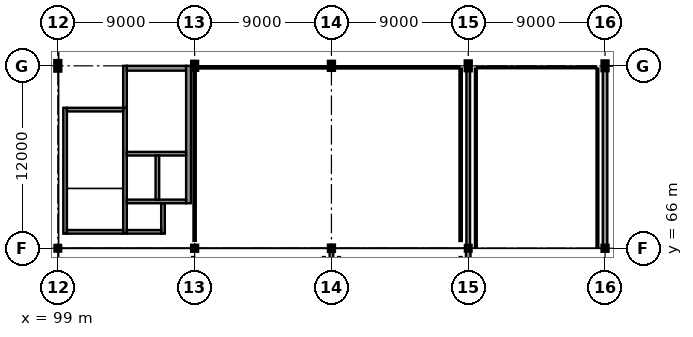
"""IFC4 building model, lengths in metres.
Left out: names, types, materials, properties, quantities, classifications, styles, units other than length and angle.
Written with IfcOpenShell. Run it as: python <this file> out.ifc"""

import sys

from ifc_helpers import new_model, si_unit, direction, frame, frame_2d, origin, origin_2d, place, context, subcontext, project, spatial, rectangle, i_section, extrude, element, fill, save


model = new_model("IFC4")
c1 = context("Model", 3, precision=1e-05, world=origin(), true_north=direction((0.0, 1.0)))
c2 = subcontext(c1, "Body", "Model", "MODEL_VIEW")
j1 = project(units=[si_unit("LENGTHUNIT", "METRE"), si_unit("PLANEANGLEUNIT", "RADIAN")], contexts=[c1])
p1 = place(None, origin())
s1 = spatial("IfcSite", under=j1, at=p1, CompositionType="ELEMENT")
p2 = place(p1, origin())
s2 = spatial("IfcBuilding", under=s1, at=p2, CompositionType="ELEMENT")
p3 = place(p2, frame((0.0, 0.0, 9.9)))
s3 = spatial("IfcBuildingStorey", under=s2, at=p3, CompositionType="ELEMENT", Elevation=9.9)
p4 = place(p3, frame((99.0, 66.0, 0.0), z_axis=(0.0, 0.0, 1.0), x_axis=(1.0, 0.0, 0.0)))
e1 = element("IfcColumn", 1, at=p4, inside=s3, PredefinedType="COLUMN", context=c2, shape_type="SweptSolid", body=[
    extrude(i_section(OverallWidth=0.28, OverallDepth=0.28, WebThickness=0.01, FlangeThickness=0.018, at=origin_2d()), origin(), (0.0, 0.0, 1.0), 4.5),
])
p5 = place(p3, frame((99.0, 78.0, 0.0), z_axis=(0.0, 0.0, 1.0), x_axis=(1.0, 0.0, 0.0)))
e2 = element("IfcColumn", 2, at=p5, inside=s3, PredefinedType="COLUMN", context=c2, shape_type="SweptSolid", body=[
    extrude(i_section(OverallWidth=0.3, OverallDepth=0.6, WebThickness=0.015, FlangeThickness=0.03, at=origin_2d()), origin(), (0.0, 0.0, 1.0), 4.5),
])
p6 = place(p3, frame((108.0, 66.0, 0.0), z_axis=(0.0, 0.0, 1.0), x_axis=(1.0, 0.0, 0.0)))
e3 = element("IfcColumn", 3, at=p6, inside=s3, PredefinedType="COLUMN", context=c2, shape_type="SweptSolid", body=[
    extrude(i_section(OverallWidth=0.3, OverallDepth=0.3, WebThickness=0.011, FlangeThickness=0.019, at=origin_2d()), origin(), (0.0, 0.0, 1.0), 4.5),
])
p7 = place(p3, frame((108.0, 78.0, 0.0), z_axis=(0.0, 0.0, 1.0), x_axis=(0.0, 1.0, 0.0)))
e4 = element("IfcColumn", 4, at=p7, inside=s3, PredefinedType="COLUMN", context=c2, shape_type="SweptSolid", body=[
    extrude(i_section(OverallWidth=0.3, OverallDepth=0.5, WebThickness=0.014, FlangeThickness=0.028, at=origin_2d()), origin(), (0.0, 0.0, 1.0), 4.5),
])
p8 = place(p3, frame((117.0, 66.0, 0.0), z_axis=(0.0, 0.0, 1.0), x_axis=(1.0, 0.0, 0.0)))
e5 = element("IfcColumn", 5, at=p8, inside=s3, PredefinedType="COLUMN", context=c2, shape_type="SweptSolid", body=[
    extrude(i_section(OverallWidth=0.3, OverallDepth=0.32, WebThickness=0.011, FlangeThickness=0.021, at=origin_2d()), origin(), (0.0, 0.0, 1.0), 4.5),
])
p9 = place(p3, frame((117.0, 78.0, 0.0), z_axis=(0.0, 0.0, 1.0), x_axis=(1.0, 0.0, 0.0)))
e6 = element("IfcColumn", 6, at=p9, inside=s3, PredefinedType="COLUMN", context=c2, shape_type="SweptSolid", body=[
    extrude(i_section(OverallWidth=0.3, OverallDepth=0.5, WebThickness=0.014, FlangeThickness=0.028, at=origin_2d()), origin(), (0.0, 0.0, 1.0), 4.5),
])
p10 = place(p3, frame((126.0, 66.0, 0.0), z_axis=(0.0, 0.0, 1.0), x_axis=(0.0, 1.0, 0.0)))
e7 = element("IfcColumn", 7, at=p10, inside=s3, PredefinedType="COLUMN", context=c2, shape_type="SweptSolid", body=[
    extrude(i_section(OverallWidth=0.28, OverallDepth=0.28, WebThickness=0.01, FlangeThickness=0.018, at=origin_2d()), origin(), (0.0, 0.0, 1.0), 4.5),
])
p11 = place(p3, frame((126.0, 78.0, 0.0), z_axis=(0.0, 0.0, 1.0), x_axis=(1.0, 0.0, 0.0)))
e8 = element("IfcColumn", 8, at=p11, inside=s3, PredefinedType="COLUMN", context=c2, shape_type="SweptSolid", body=[
    extrude(i_section(OverallWidth=0.3, OverallDepth=0.55, WebThickness=0.015, FlangeThickness=0.029, at=origin_2d()), origin(), (0.0, 0.0, 1.0), 4.5),
])
p12 = place(p3, frame((135.0, 66.0, 0.0), z_axis=(0.0, 0.0, 1.0), x_axis=(1.0, 0.0, 0.0)))
e9 = element("IfcColumn", 9, at=p12, inside=s3, PredefinedType="COLUMN", context=c2, shape_type="SweptSolid", body=[
    extrude(i_section(OverallWidth=0.3, OverallDepth=0.3, WebThickness=0.011, FlangeThickness=0.019, at=origin_2d()), origin(), (0.0, 0.0, 1.0), 4.5),
])
p13 = place(p3, frame((135.0, 78.0, 0.0), z_axis=(0.0, 0.0, 1.0), x_axis=(1.0, 0.0, 0.0)))
e10 = element("IfcColumn", 10, at=p13, inside=s3, PredefinedType="COLUMN", context=c2, shape_type="SweptSolid", body=[
    extrude(i_section(OverallWidth=0.3, OverallDepth=0.55, WebThickness=0.015, FlangeThickness=0.029, at=origin_2d()), origin(), (0.0, 0.0, 1.0), 4.5),
])
p14 = place(p3, frame((135.0, 66.148, 0.0), z_axis=(0.0, 0.0, 1.0), x_axis=(0.0, 1.0, 0.0)))
e11 = element("IfcWall", 11, at=p14, inside=s3, PredefinedType="SOLIDWALL", context=c2, shape_type="SweptSolid", body=[
    extrude(rectangle(XDim=11.579, YDim=0.3, at=frame_2d((5.79, 0.0))), origin(), (0.0, 0.0, 1.0), 3.845),
])
p15 = place(p14, frame((2.242, 0.0, 0.8)))
e12 = element("IfcOpeningElement", 12, at=p15, cuts=e11, PredefinedType="OPENING", context=c2, shape_type="SweptSolid", body=[
    extrude(rectangle(XDim=2.0, YDim=2.0, at=frame_2d((1.0, 1.0))), frame((0.0, 0.165, 0.0), z_axis=(0.0, -1.0, 0.0), x_axis=(1.0, 0.0, 0.0)), (0.0, 0.0, 1.0), 0.33),
])
p16 = place(p14, frame((7.337, 0.0, 0.8)))
e13 = element("IfcOpeningElement", 13, at=p16, cuts=e11, PredefinedType="OPENING", context=c2, shape_type="SweptSolid", body=[
    extrude(rectangle(XDim=2.0, YDim=2.0, at=frame_2d((1.0, 1.0))), frame((0.0, 0.165, 0.0), z_axis=(0.0, -1.0, 0.0), x_axis=(1.0, 0.0, 0.0)), (0.0, 0.0, 1.0), 0.33),
])
p17 = place(p3, frame((126.0, 54.138, 0.0), z_axis=(0.0, 0.0, 1.0), x_axis=(0.0, 1.0, 0.0)))
e14 = element("IfcWall", 14, at=p17, inside=s3, PredefinedType="SOLIDWALL", context=c2, shape_type="SweptSolid", body=[
    extrude(rectangle(XDim=11.854, YDim=0.3, at=frame_2d((5.927, 0.0))), origin(), (0.0, 0.0, 1.0), 3.695),
])
p18 = place(p3, frame((99.48, 66.96, 0.0), z_axis=(0.0, 0.0, 1.0), x_axis=(0.0, 1.0, 0.0)))
e15 = element("IfcWall", 15, at=p18, inside=s3, PredefinedType="SHEAR", context=c2, shape_type="SweptSolid", body=[
    extrude(rectangle(XDim=8.28, YDim=0.24, at=frame_2d((4.14, 0.0))), origin(), (0.0, 0.0, 1.0), 4.31),
])
p19 = place(p3, frame((103.42, 66.96, 0.0), z_axis=(0.0, 0.0, 1.0), x_axis=(0.0, 1.0, 0.0)))
e16 = element("IfcWall", 16, at=p19, inside=s3, PredefinedType="SHEAR", context=c2, shape_type="SweptSolid", body=[
    extrude(rectangle(XDim=8.28, YDim=0.24, at=frame_2d((4.14, 0.0))), origin(), (0.0, 0.0, 1.0), 4.31),
])
p20 = place(p19, frame((6.49, 0.0, 0.0)))
e17 = element("IfcOpeningElement", 17, at=p20, cuts=e16, PredefinedType="OPENING", context=c2, shape_type="SweptSolid", body=[
    extrude(rectangle(XDim=1.3, YDim=2.2, at=frame_2d((0.65, 1.1))), frame((0.0, 0.135, 0.0), z_axis=(0.0, -1.0, 0.0), x_axis=(1.0, 0.0, 0.0)), (0.0, 0.0, 1.0), 0.27),
])
for number, where, z_axis, x_axis in (
    (18, (99.6, 67.08, 0.0), (0.0, 0.0, 1.0), (1.0, 0.0, 0.0)),
    (19, (99.6, 75.12, 0.0), (0.0, 0.0, 1.0), (1.0, 0.0, 0.0)),
):
    element("IfcWall", number, at=place(p3, frame(where, z_axis=z_axis, x_axis=x_axis)), inside=s3, PredefinedType="SHEAR", context=c2, shape_type="SweptSolid", body=[
        extrude(rectangle(XDim=3.7, YDim=0.24, at=frame_2d((1.85, 0.0))), origin(), (0.0, 0.0, 1.0), 4.31),
    ])
p21 = place(p3, frame((103.42, 75.24, 0.0), z_axis=(0.0, 0.0, 1.0), x_axis=(0.0, 1.0, 0.0)))
e20 = element("IfcWall", 20, at=p21, inside=s3, PredefinedType="SHEAR", context=c2, shape_type="SweptSolid", body=[
    extrude(rectangle(XDim=2.76, YDim=0.24, at=frame_2d((1.38, 0.0))), origin(), (0.0, 0.0, 1.0), 4.16),
])
p22 = place(p3, frame((103.54, 77.84, 0.0), z_axis=(0.0, 0.0, 1.0), x_axis=(1.0, 0.0, 0.0)))
e21 = element("IfcWall", 21, at=p22, inside=s3, PredefinedType="SHEAR", context=c2, shape_type="SweptSolid", body=[
    extrude(rectangle(XDim=3.9, YDim=0.32, at=frame_2d((1.95, 0.0))), origin(), (0.0, 0.0, 1.0), 4.16),
])
p23 = place(p22, frame((1.225, 0.0, 0.0)))
e22 = element("IfcOpeningElement", 22, at=p23, cuts=e21, PredefinedType="OPENING", context=c2, shape_type="SweptSolid", body=[
    extrude(rectangle(XDim=1.45, YDim=2.2, at=frame_2d((0.725, 1.1))), frame((0.0, 0.175, 0.0), z_axis=(0.0, -1.0, 0.0), x_axis=(1.0, 0.0, 0.0)), (0.0, 0.0, 1.0), 0.35),
])
p24 = place(p3, frame((107.6, 68.96, 0.0), z_axis=(0.0, 0.0, 1.0), x_axis=(0.0, 1.0, 0.0)))
e23 = element("IfcWall", 23, at=p24, inside=s3, PredefinedType="SHEAR", context=c2, shape_type="SweptSolid", body=[
    extrude(rectangle(XDim=9.04, YDim=0.32, at=frame_2d((4.52, 0.0))), origin(), (0.0, 0.0, 1.0), 4.16),
])
p25 = place(p3, frame((103.54, 72.22, 0.0), z_axis=(0.0, 0.0, 1.0), x_axis=(1.0, 0.0, 0.0)))
e24 = element("IfcWall", 24, at=p25, inside=s3, PredefinedType="SHEAR", context=c2, shape_type="SweptSolid", body=[
    extrude(rectangle(XDim=3.9, YDim=0.24, at=frame_2d((1.95, 0.0))), origin(), (0.0, 0.0, 1.0), 4.31),
])
p26 = place(p25, frame((0.385, 0.0, 0.0)))
e25 = element("IfcOpeningElement", 25, at=p26, cuts=e24, PredefinedType="OPENING", context=c2, shape_type="SweptSolid", body=[
    extrude(rectangle(XDim=1.3, YDim=2.2, at=frame_2d((0.65, 1.1))), frame((0.0, 0.135, 0.0), z_axis=(0.0, -1.0, 0.0), x_axis=(1.0, 0.0, 0.0)), (0.0, 0.0, 1.0), 0.27),
])
p27 = place(p25, frame((2.335, 0.0, 0.0)))
e26 = element("IfcOpeningElement", 26, at=p27, cuts=e24, PredefinedType="OPENING", context=c2, shape_type="SweptSolid", body=[
    extrude(rectangle(XDim=1.3, YDim=2.2, at=frame_2d((0.65, 1.1))), frame((0.0, 0.135, 0.0), z_axis=(0.0, -1.0, 0.0), x_axis=(1.0, 0.0, 0.0)), (0.0, 0.0, 1.0), 0.27),
])
p28 = place(p3, frame((103.54, 69.08, 0.0), z_axis=(0.0, 0.0, 1.0), x_axis=(1.0, 0.0, 0.0)))
e27 = element("IfcWall", 27, at=p28, inside=s3, PredefinedType="SHEAR", context=c2, shape_type="SweptSolid", body=[
    extrude(rectangle(XDim=3.9, YDim=0.24, at=frame_2d((1.95, 0.0))), origin(), (0.0, 0.0, 1.0), 4.31),
])
p29 = place(p3, frame((105.55, 69.2, 0.0), z_axis=(0.0, 0.0, 1.0), x_axis=(0.0, 1.0, 0.0)))
e28 = element("IfcWall", 28, at=p29, inside=s3, PredefinedType="SHEAR", context=c2, shape_type="SweptSolid", body=[
    extrude(rectangle(XDim=2.9, YDim=0.24, at=frame_2d((1.45, 0.0))), origin(), (0.0, 0.0, 1.0), 4.31),
])
p30 = place(p3, frame((105.92, 66.96, 0.0), z_axis=(0.0, 0.0, 1.0), x_axis=(0.0, 1.0, 0.0)))
e29 = element("IfcWall", 29, at=p30, inside=s3, PredefinedType="SHEAR", context=c2, shape_type="SweptSolid", body=[
    extrude(rectangle(XDim=2.0, YDim=0.24, at=frame_2d((1.0, 0.0))), origin(), (0.0, 0.0, 1.0), 4.31),
])
p31 = place(p3, frame((103.54, 67.08, 0.0), z_axis=(0.0, 0.0, 1.0), x_axis=(1.0, 0.0, 0.0)))
e30 = element("IfcWall", 30, at=p31, inside=s3, PredefinedType="SHEAR", context=c2, shape_type="SweptSolid", body=[
    extrude(rectangle(XDim=2.26, YDim=0.24, at=frame_2d((1.13, 0.0))), origin(), (0.0, 0.0, 1.0), 4.31),
])
p32 = place(p3, frame((126.0, 66.008, 0.0), z_axis=(0.0, 0.0, 1.0), x_axis=(0.0, 1.0, 0.0)))
e31 = element("IfcWall", 31, at=p32, inside=s3, PredefinedType="SHEAR", context=c2, shape_type="SweptSolid", body=[
    extrude(rectangle(XDim=11.719, YDim=0.24, at=frame_2d((5.859, 0.0))), origin(), (0.0, 0.0, 1.0), 3.595),
])
p33 = place(p3, frame((117.0, 54.128, 0.0), z_axis=(0.0, 0.0, 1.0), x_axis=(0.0, 1.0, 0.0)))
e32 = element("IfcWall", 32, at=p33, inside=s3, PredefinedType="SHEAR", context=c2, shape_type="SweptSolid", body=[
    extrude(rectangle(XDim=11.714, YDim=0.24, at=frame_2d((5.857, 0.0))), origin(), (0.0, 0.0, 1.0), 3.745),
])
p34 = place(p3, frame((108.0, 66.48, 0.0), z_axis=(0.0, 0.0, 1.0), x_axis=(0.0, 1.0, 0.0)))
e33 = element("IfcWall", 33, at=p34, inside=s3, PredefinedType="PARTITIONING", context=c2, shape_type="SweptSolid", body=[
    extrude(rectangle(XDim=11.34, YDim=0.15, at=frame_2d((5.67, 0.0))), origin(), (0.0, 0.0, 1.0), 3.705),
])
p35 = place(p3, frame((107.848, 77.9, 0.0), z_axis=(0.0, 0.0, 1.0), x_axis=(1.0, 0.0, 0.0)))
e34 = element("IfcWall", 34, at=p35, inside=s3, PredefinedType="PARTITIONING", context=c2, shape_type="SweptSolid", body=[
    extrude(rectangle(XDim=17.572, YDim=0.15, at=frame_2d((8.786, 0.0))), origin(), (0.0, 0.0, 1.0), 3.705),
])
p36 = place(p35, frame((7.558, 0.0, 0.0)))
e35 = element("IfcOpeningElement", 35, at=p36, cuts=e34, PredefinedType="OPENING", context=c2, shape_type="SweptSolid", body=[
    extrude(rectangle(XDim=1.05, YDim=2.25, at=frame_2d((0.525, 1.125))), frame((0.0, 0.09, 0.0), z_axis=(0.0, -1.0, 0.0), x_axis=(1.0, 0.0, 0.0)), (0.0, 0.0, 1.0), 0.18),
])
p37 = place(p3, frame((125.5, 77.82, 0.0), z_axis=(0.0, 0.0, 1.0), x_axis=(0.0, -1.0, 0.0)))
e36 = element("IfcWall", 36, at=p37, inside=s3, PredefinedType="PARTITIONING", context=c2, shape_type="SweptSolid", body=[
    extrude(rectangle(XDim=11.34, YDim=0.15, at=frame_2d((5.67, 0.0))), origin(), (0.0, 0.0, 1.0), 4.14),
])
p38 = place(p3, frame((126.5, 66.075, 0.0), z_axis=(0.0, 0.0, 1.0), x_axis=(0.0, 1.0, 0.0)))
e37 = element("IfcWall", 37, at=p38, inside=s3, PredefinedType="PARTITIONING", context=c2, shape_type="SweptSolid", body=[
    extrude(rectangle(XDim=11.745, YDim=0.12, at=frame_2d((5.873, 0.0))), origin(), (0.0, 0.0, 1.0), 4.14),
])
p39 = place(p3, frame((126.58, 77.9, 0.0), z_axis=(0.0, 0.0, 1.0), x_axis=(1.0, 0.0, 0.0)))
e38 = element("IfcWall", 38, at=p39, inside=s3, PredefinedType="PARTITIONING", context=c2, shape_type="SweptSolid", body=[
    extrude(rectangle(XDim=7.84, YDim=0.12, at=frame_2d((3.92, 0.0))), origin(), (0.0, 0.0, 1.0), 3.705),
])
p40 = place(p39, frame((3.445, 0.0, 0.0)))
e39 = element("IfcOpeningElement", 39, at=p40, cuts=e38, PredefinedType="OPENING", context=c2, shape_type="SweptSolid", body=[
    extrude(rectangle(XDim=0.95, YDim=2.15, at=frame_2d((0.475, 1.075))), frame((0.0, 0.075, 0.0), z_axis=(0.0, -1.0, 0.0), x_axis=(1.0, 0.0, 0.0)), (0.0, 0.0, 1.0), 0.15),
])
p41 = place(p3, frame((134.5, 77.82, 0.0), z_axis=(0.0, 0.0, 1.0), x_axis=(0.0, -1.0, 0.0)))
e40 = element("IfcWall", 40, at=p41, inside=s3, PredefinedType="PARTITIONING", context=c2, shape_type="SweptSolid", body=[
    extrude(rectangle(XDim=11.745, YDim=0.12, at=frame_2d((5.873, 0.0))), origin(), (0.0, 0.0, 1.0), 4.14),
])
p42 = place(p3, frame((116.5, 65.42, 0.0), z_axis=(0.0, 0.0, 1.0), x_axis=(0.0, -1.0, 0.0)))
e41 = element("IfcWall", 41, at=p42, inside=s3, PredefinedType="PARTITIONING", context=c2, shape_type="SweptSolid", body=[
    extrude(rectangle(XDim=10.84, YDim=0.12, at=frame_2d((5.42, 0.0))), origin(), (0.0, 0.0, 1.0), 4.14),
])
p43 = place(p3, frame((107.9, 54.58, 0.0), z_axis=(0.0, 0.0, 1.0), x_axis=(0.0, 1.0, 0.0)))
e42 = element("IfcWall", 42, at=p43, inside=s3, PredefinedType="PARTITIONING", context=c2, shape_type="SweptSolid", body=[
    extrude(rectangle(XDim=10.84, YDim=0.12, at=frame_2d((5.42, 0.0))), origin(), (0.0, 0.0, 1.0), 3.805),
])
p44 = place(p43, frame((4.945, 0.0, 0.0)))
e43 = element("IfcOpeningElement", 43, at=p44, cuts=e42, PredefinedType="OPENING", context=c2, shape_type="SweptSolid", body=[
    extrude(rectangle(XDim=0.95, YDim=2.15, at=frame_2d((0.475, 1.075))), frame((0.0, 0.075, 0.0), z_axis=(0.0, -1.0, 0.0), x_axis=(1.0, 0.0, 0.0)), (0.0, 0.0, 1.0), 0.15),
])
for number, where, z_axis, x_axis in (
    (44, (125.5, 65.42, 0.0), (0.0, 0.0, 1.0), (0.0, -1.0, 0.0)),
    (45, (117.5, 54.58, 0.0), (0.0, 0.0, 1.0), (0.0, 1.0, 0.0)),
):
    element("IfcWall", number, at=place(p3, frame(where, z_axis=z_axis, x_axis=x_axis)), inside=s3, PredefinedType="PARTITIONING", context=c2, shape_type="SweptSolid", body=[
        extrude(rectangle(XDim=10.84, YDim=0.12, at=frame_2d((5.42, 0.0))), origin(), (0.0, 0.0, 1.0), 4.14),
    ])
p45 = place(p15, origin())
e46 = element("IfcWindow", 46, at=p45, inside=s3, PartitioningType="SINGLE_PANEL", PredefinedType="WINDOW", context=c2, shape_type="SweptSolid", body=[
    extrude(rectangle(XDim=2.0, YDim=2.0, at=frame_2d((1.0, 1.0))), frame((0.0, 0.03, 0.0), z_axis=(0.0, -1.0, 0.0), x_axis=(1.0, 0.0, 0.0)), (0.0, 0.0, 1.0), 0.06),
])
fill(e12, e46)
p46 = place(p16, origin())
e47 = element("IfcWindow", 47, at=p46, inside=s3, PartitioningType="SINGLE_PANEL", PredefinedType="WINDOW", context=c2, shape_type="SweptSolid", body=[
    extrude(rectangle(XDim=2.0, YDim=2.0, at=frame_2d((1.0, 1.0))), frame((0.0, 0.03, 0.0), z_axis=(0.0, -1.0, 0.0), x_axis=(1.0, 0.0, 0.0)), (0.0, 0.0, 1.0), 0.06),
])
fill(e13, e47)
p47 = place(p20, frame((1.3, 0.0, 0.0), z_axis=(0.0, 0.0, 1.0), x_axis=(-1.0, 0.0, 0.0)))
e48 = element("IfcDoor", 48, at=p47, inside=s3, OperationType="SINGLE_SWING_LEFT", PredefinedType="DOOR", context=c2, shape_type="SweptSolid", body=[
    extrude(rectangle(XDim=1.3, YDim=2.2, at=frame_2d((0.65, 1.1))), frame((0.0, 0.025, 0.0), z_axis=(0.0, -1.0, 0.0), x_axis=(1.0, 0.0, 0.0)), (0.0, 0.0, 1.0), 0.05),
])
fill(e17, e48)
p48 = place(p23, origin())
e49 = element("IfcDoor", 49, at=p48, inside=s3, OperationType="DOUBLE_DOOR_SINGLE_SWING", PredefinedType="DOOR", context=c2, shape_type="SweptSolid", body=[
    extrude(rectangle(XDim=1.45, YDim=2.2, at=frame_2d((0.725, 1.1))), frame((0.0, 0.025, 0.0), z_axis=(0.0, -1.0, 0.0), x_axis=(1.0, 0.0, 0.0)), (0.0, 0.0, 1.0), 0.05),
])
fill(e22, e49)
p49 = place(p26, origin())
e50 = element("IfcDoor", 50, at=p49, inside=s3, OperationType="DOUBLE_DOOR_SLIDING", PredefinedType="DOOR", context=c2, shape_type="SweptSolid", body=[
    extrude(rectangle(XDim=1.3, YDim=2.2, at=frame_2d((0.65, 1.1))), frame((0.0, 0.025, 0.0), z_axis=(0.0, -1.0, 0.0), x_axis=(1.0, 0.0, 0.0)), (0.0, 0.0, 1.0), 0.05),
])
fill(e25, e50)
p50 = place(p27, origin())
e51 = element("IfcDoor", 51, at=p50, inside=s3, OperationType="DOUBLE_DOOR_SLIDING", PredefinedType="DOOR", context=c2, shape_type="SweptSolid", body=[
    extrude(rectangle(XDim=1.3, YDim=2.2, at=frame_2d((0.65, 1.1))), frame((0.0, 0.025, 0.0), z_axis=(0.0, -1.0, 0.0), x_axis=(1.0, 0.0, 0.0)), (0.0, 0.0, 1.0), 0.05),
])
fill(e26, e51)
p51 = place(p36, frame((1.05, 0.0, 0.0), z_axis=(0.0, 0.0, 1.0), x_axis=(-1.0, 0.0, 0.0)))
e52 = element("IfcDoor", 52, at=p51, inside=s3, OperationType="SINGLE_SWING_LEFT", PredefinedType="DOOR", context=c2, shape_type="SweptSolid", body=[
    extrude(rectangle(XDim=1.05, YDim=2.25, at=frame_2d((0.525, 1.125))), frame((0.0, 0.025, 0.0), z_axis=(0.0, -1.0, 0.0), x_axis=(1.0, 0.0, 0.0)), (0.0, 0.0, 1.0), 0.05),
])
fill(e35, e52)
p52 = place(p40, origin())
e53 = element("IfcDoor", 53, at=p52, inside=s3, OperationType="SINGLE_SWING_RIGHT", PredefinedType="DOOR", context=c2, shape_type="SweptSolid", body=[
    extrude(rectangle(XDim=0.95, YDim=2.15, at=frame_2d((0.475, 1.075))), frame((0.0, 0.025, 0.0), z_axis=(0.0, -1.0, 0.0), x_axis=(1.0, 0.0, 0.0)), (0.0, 0.0, 1.0), 0.05),
])
fill(e39, e53)
save(model, sys.argv[1])
